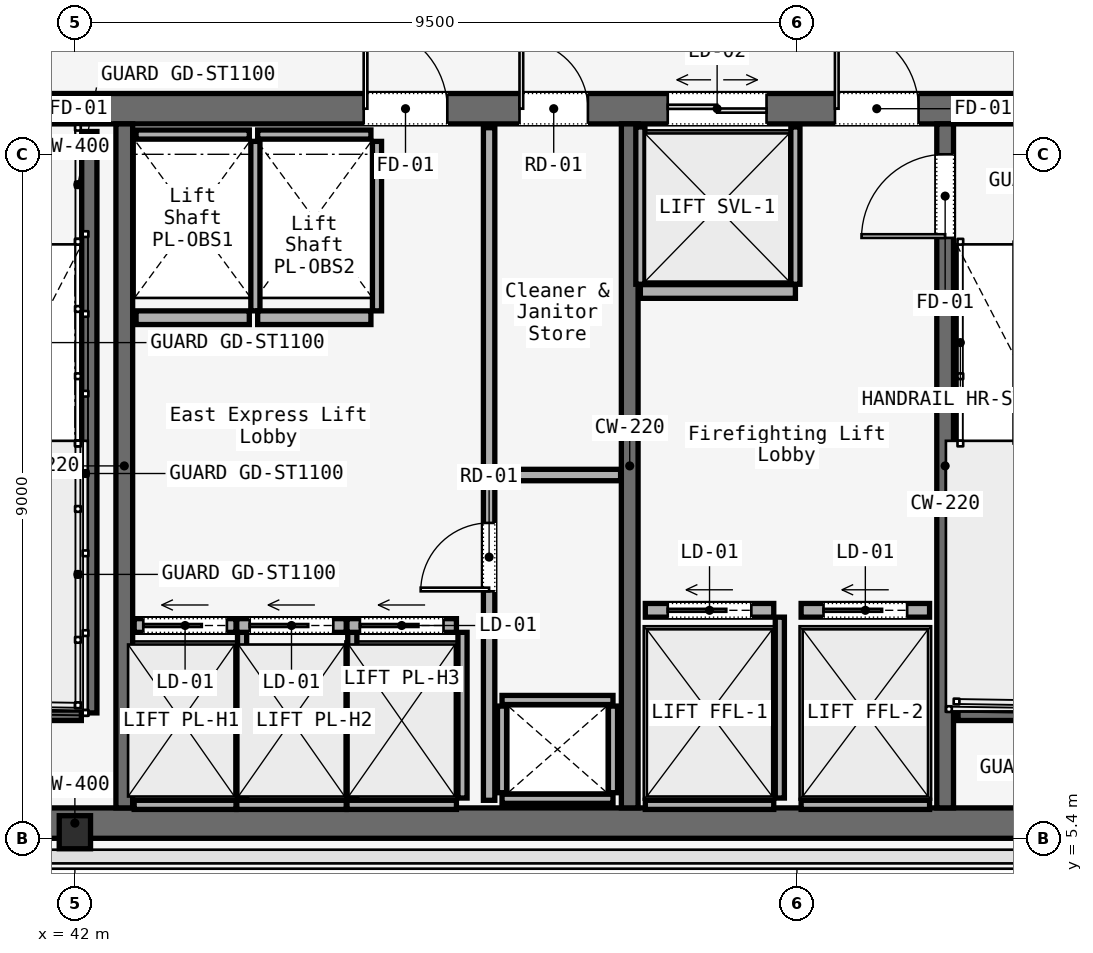
"""IFC4 building model, lengths in metres.
Left out: names, types, materials, properties, quantities, classifications, styles, units other than length and angle.
Written with IfcOpenShell. Run it as: python <this file> out.ifc"""

import sys

from ifc_helpers import new_model, si_unit, direction, frame, frame_2d, origin, origin_2d, place, context, subcontext, project, spatial, rectangle, i_section, extrude, element, fill, save


model = new_model("IFC4")
c1 = context("Model", 3, precision=1e-05, world=origin(), true_north=direction((0.0, 1.0)))
c2 = subcontext(c1, "Body", "Model", "MODEL_VIEW")
j1 = project(units=[si_unit("LENGTHUNIT", "METRE"), si_unit("PLANEANGLEUNIT", "RADIAN")], contexts=[c1])
p1 = place(None, origin())
s1 = spatial("IfcSite", under=j1, at=p1, CompositionType="ELEMENT")
p2 = place(p1, origin())
s2 = spatial("IfcBuilding", under=s1, at=p2, CompositionType="ELEMENT")
p3 = place(p2, frame((0.0, 0.0, 225.6)))
s3 = spatial("IfcBuildingStorey", under=s2, at=p3, CompositionType="ELEMENT", Elevation=225.6)
p4 = place(p3, frame((26.45, 15.0, 0.0), z_axis=(0.0, 0.0, 1.0), x_axis=(1.0, 0.0, 0.0)))
e1 = element("IfcWall", 1, at=p4, inside=s3, PredefinedType="SOLIDWALL", context=c2, shape_type="SweptSolid", body=[
    extrude(rectangle(XDim=31.1, YDim=0.4, at=frame_2d((15.55, 0.0))), origin(), (0.0, 0.0, 1.0), 3.58),
])
p5 = place(p4, frame((1.65, 0.0, 0.0)))
e2 = element("IfcOpeningElement", 2, at=p5, cuts=e1, PredefinedType="OPENING", context=c2, shape_type="SweptSolid", body=[
    extrude(rectangle(XDim=1.1, YDim=2.2, at=frame_2d((0.55, 1.1))), frame((0.0, 0.2, 0.0), z_axis=(0.0, -1.0, 0.0), x_axis=(1.0, 0.0, 0.0)), (0.0, 0.0, 1.0), 0.4),
])
p6 = place(p4, frame((13.65, 0.0, 0.0)))
e3 = element("IfcOpeningElement", 3, at=p6, cuts=e1, PredefinedType="OPENING", context=c2, shape_type="SweptSolid", body=[
    extrude(rectangle(XDim=1.1, YDim=2.2, at=frame_2d((0.55, 1.1))), frame((0.0, 0.2, 0.0), z_axis=(0.0, -1.0, 0.0), x_axis=(1.0, 0.0, 0.0)), (0.0, 0.0, 1.0), 0.4),
])
p7 = place(p4, frame((25.55, 0.0, 0.0)))
e4 = element("IfcOpeningElement", 4, at=p7, cuts=e1, PredefinedType="OPENING", context=c2, shape_type="SweptSolid", body=[
    extrude(rectangle(XDim=1.1, YDim=2.2, at=frame_2d((0.55, 1.1))), frame((0.0, 0.2, 0.0), z_axis=(0.0, -1.0, 0.0), x_axis=(1.0, 0.0, 0.0)), (0.0, 0.0, 1.0), 0.4),
])
p8 = place(p4, frame((19.35, 0.0, 0.0)))
e5 = element("IfcOpeningElement", 5, at=p8, cuts=e1, PredefinedType="OPENING", context=c2, shape_type="SweptSolid", body=[
    extrude(rectangle(XDim=1.1, YDim=2.2, at=frame_2d((0.55, 1.1))), frame((0.0, 0.2, 0.0), z_axis=(0.0, -1.0, 0.0), x_axis=(1.0, 0.0, 0.0)), (0.0, 0.0, 1.0), 0.4),
])
p9 = place(p4, frame((21.4, 0.0, 0.0)))
e6 = element("IfcOpeningElement", 6, at=p9, cuts=e1, PredefinedType="OPENING", context=c2, shape_type="SweptSolid", body=[
    extrude(rectangle(XDim=0.9, YDim=2.1, at=frame_2d((0.45, 1.05))), frame((0.0, 0.2, 0.0), z_axis=(0.0, -1.0, 0.0), x_axis=(1.0, 0.0, 0.0)), (0.0, 0.0, 1.0), 0.4),
])
p10 = place(p4, frame((6.04, 0.0, 0.0)))
e7 = element("IfcOpeningElement", 7, at=p10, cuts=e1, PredefinedType="OPENING", context=c2, shape_type="SweptSolid", body=[
    extrude(rectangle(XDim=0.95, YDim=2.2, at=frame_2d((0.475, 1.1))), frame((0.0, 0.2, 0.0), z_axis=(0.0, -1.0, 0.0), x_axis=(1.0, 0.0, 0.0)), (0.0, 0.0, 1.0), 0.4),
])
p11 = place(p4, frame((9.99, 0.0, 0.0)))
e8 = element("IfcOpeningElement", 8, at=p11, cuts=e1, PredefinedType="OPENING", context=c2, shape_type="SweptSolid", body=[
    extrude(rectangle(XDim=0.95, YDim=2.2, at=frame_2d((0.475, 1.1))), frame((0.0, 0.2, 0.0), z_axis=(0.0, -1.0, 0.0), x_axis=(1.0, 0.0, 0.0)), (0.0, 0.0, 1.0), 0.4),
])
p12 = place(p4, frame((23.35, 0.0, 0.0)))
e9 = element("IfcOpeningElement", 9, at=p12, cuts=e1, PredefinedType="OPENING", context=c2, shape_type="SweptSolid", body=[
    extrude(rectangle(XDim=1.3, YDim=2.3, at=frame_2d((0.65, 1.15))), frame((0.0, 0.2, 0.0), z_axis=(0.0, -1.0, 0.0), x_axis=(1.0, 0.0, 0.0)), (0.0, 0.0, 1.0), 0.4),
])
p13 = place(p3, frame((26.45, 5.6, 0.0), z_axis=(0.0, 0.0, 1.0), x_axis=(1.0, 0.0, 0.0)))
e10 = element("IfcWall", 10, at=p13, inside=s3, PredefinedType="SOLIDWALL", context=c2, shape_type="SweptSolid", body=[
    extrude(rectangle(XDim=31.1, YDim=0.4, at=frame_2d((15.55, 0.0))), origin(), (0.0, 0.0, 1.0), 3.58),
])
for number, where, z_axis, x_axis in (
    (11, (42.65, 5.8, 0.0), (0.0, 0.0, 1.0), (0.0, 1.0, 0.0)),
    (12, (49.3, 5.8, 0.0), (0.0, 0.0, 1.0), (0.0, 1.0, 0.0)),
):
    element("IfcWall", number, at=place(p3, frame(where, z_axis=z_axis, x_axis=x_axis)), inside=s3, PredefinedType="SOLIDWALL", context=c2, shape_type="SweptSolid", body=[
        extrude(rectangle(XDim=9.0, YDim=0.22, at=frame_2d((4.5, 0.0))), origin(), (0.0, 0.0, 1.0), 3.58),
    ])
p14 = place(p3, frame((53.45, 5.8, 0.0), z_axis=(0.0, 0.0, 1.0), x_axis=(0.0, 1.0, 0.0)))
e13 = element("IfcWall", 13, at=p14, inside=s3, PredefinedType="SOLIDWALL", context=c2, shape_type="SweptSolid", body=[
    extrude(rectangle(XDim=9.0, YDim=0.22, at=frame_2d((4.5, 0.0))), origin(), (0.0, 0.0, 1.0), 3.58),
])
p15 = place(p14, frame((7.5, 0.0, 0.0)))
e14 = element("IfcOpeningElement", 14, at=p15, cuts=e13, PredefinedType="OPENING", context=c2, shape_type="SweptSolid", body=[
    extrude(rectangle(XDim=1.1, YDim=2.2, at=frame_2d((0.55, 1.1))), frame((0.0, 0.11, 0.0), z_axis=(0.0, -1.0, 0.0), x_axis=(1.0, 0.0, 0.0)), (0.0, 0.0, 1.0), 0.22),
])
p16 = place(p3, frame((42.0, 5.48, 0.0), z_axis=(0.0, 0.0, 1.0), x_axis=(1.0, 0.0, 0.0)))
e15 = element("IfcColumn", 15, at=p16, inside=s3, PredefinedType="COLUMN", context=c2, shape_type="SweptSolid", body=[
    extrude(i_section(OverallWidth=0.412, OverallDepth=0.435, WebThickness=0.036, FlangeThickness=0.044, FilletRadius=0.015, at=origin_2d()), origin(), (0.0, 0.0, 1.0), 3.58),
])
p17 = place(p3, frame((42.19, 14.7, 0.0), z_axis=(0.0, 0.0, 1.0), x_axis=(0.0, -1.0, 0.0)))
e16 = element("IfcWall", 16, at=p17, inside=s3, PredefinedType="SOLIDWALL", context=c2, shape_type="SweptSolid", body=[
    extrude(rectangle(XDim=7.65, YDim=0.2, at=frame_2d((3.825, 0.0))), origin(), (0.0, 0.0, 1.0), 3.8),
])
for number, where, z_axis, x_axis in (
    (17, (38.97, 7.05, 0.0), (0.0, 0.0, 1.0), (1.0, 0.0, 0.0)),
    (18, (53.62, 7.05, 0.0), (0.0, 0.0, 1.0), (1.0, 0.0, 0.0)),
):
    element("IfcWall", number, at=place(p3, frame(where, z_axis=z_axis, x_axis=x_axis)), inside=s3, PredefinedType="SOLIDWALL", context=c2, shape_type="SweptSolid", body=[
        extrude(rectangle(XDim=3.115, YDim=0.2, at=frame_2d((1.558, 0.0))), origin(), (0.0, 0.0, 1.0), 3.8),
    ])
for number, where, z_axis, x_axis in (
    (19, (47.62, 5.92, 0.0), (0.0, 0.0, 1.0), (1.0, 0.0, 0.0)),
    (20, (47.62, 7.22, 0.0), (0.0, 0.0, 1.0), (1.0, 0.0, 0.0)),
):
    element("IfcWall", number, at=place(p3, frame(where, z_axis=z_axis, x_axis=x_axis)), inside=s3, PredefinedType="SOLIDWALL", context=c2, shape_type="SweptSolid", body=[
        extrude(rectangle(XDim=1.46, YDim=0.12, at=frame_2d((0.73, 0.0))), origin(), (0.0, 0.0, 1.0), 3.01),
    ])
for number, where, z_axis, x_axis in (
    (21, (47.62, 6.0, 0.0), (0.0, 0.0, 1.0), (0.0, 1.0, 0.0)),
    (22, (49.08, 6.0, 0.0), (0.0, 0.0, 1.0), (0.0, 1.0, 0.0)),
):
    element("IfcWall", number, at=place(p3, frame(where, z_axis=z_axis, x_axis=x_axis)), inside=s3, PredefinedType="SOLIDWALL", context=c2, shape_type="SweptSolid", body=[
        extrude(rectangle(XDim=1.14, YDim=0.12, at=frame_2d((0.57, 0.0))), origin(), (0.0, 0.0, 1.0), 3.01),
    ])
p18 = place(p3, frame((47.45, 5.9, 0.0), z_axis=(0.0, 0.0, 1.0), x_axis=(0.0, 1.0, 0.0)))
e23 = element("IfcWall", 23, at=p18, inside=s3, PredefinedType="PARTITIONING", context=c2, shape_type="SweptSolid", body=[
    extrude(rectangle(XDim=8.85, YDim=0.15, at=frame_2d((4.425, 0.0))), origin(), (0.0, 0.0, 1.0), 3.01),
])
p19 = place(p18, frame((2.75, 0.0, 0.0)))
e24 = element("IfcOpeningElement", 24, at=p19, cuts=e23, PredefinedType="OPENING", context=c2, shape_type="SweptSolid", body=[
    extrude(rectangle(XDim=0.9, YDim=2.1, at=frame_2d((0.45, 1.05))), frame((0.0, 0.075, 0.0), z_axis=(0.0, -1.0, 0.0), x_axis=(1.0, 0.0, 0.0)), (0.0, 0.0, 1.0), 0.15),
])
p20 = place(p3, frame((47.45, 10.18, 0.0), z_axis=(0.0, 0.0, 1.0), x_axis=(1.0, 0.0, 0.0)))
e25 = element("IfcWall", 25, at=p20, inside=s3, PredefinedType="PARTITIONING", context=c2, shape_type="SweptSolid", body=[
    extrude(rectangle(XDim=1.73, YDim=0.15, at=frame_2d((0.865, 0.0))), origin(), (0.0, 0.0, 1.0), 3.01),
])
p21 = place(p3, frame((42.78, 8.2, 0.0), z_axis=(0.0, 0.0, 1.0), x_axis=(1.0, 0.0, 0.0)))
e26 = element("IfcWall", 26, at=p21, inside=s3, PredefinedType="SOLIDWALL", context=c2, shape_type="SweptSolid", body=[
    extrude(rectangle(XDim=1.34, YDim=0.18, at=frame_2d((0.67, 0.0))), origin(), (0.0, 0.0, 1.0), 3.01),
])
p22 = place(p21, frame((0.12, 0.0, 0.0)))
e27 = element("IfcOpeningElement", 27, at=p22, cuts=e26, PredefinedType="OPENING", context=c2, shape_type="SweptSolid", body=[
    extrude(rectangle(XDim=1.1, YDim=2.2, at=frame_2d((0.55, 1.1))), frame((0.0, 0.09, 0.0), z_axis=(0.0, -1.0, 0.0), x_axis=(1.0, 0.0, 0.0)), (0.0, 0.0, 1.0), 0.18),
])
p23 = place(p3, frame((42.78, 5.84, 0.0), z_axis=(0.0, 0.0, 1.0), x_axis=(1.0, 0.0, 0.0)))
e28 = element("IfcWall", 28, at=p23, inside=s3, PredefinedType="SOLIDWALL", context=c2, shape_type="SweptSolid", body=[
    extrude(rectangle(XDim=1.34, YDim=0.12, at=frame_2d((0.67, 0.0))), origin(), (0.0, 0.0, 1.0), 3.01),
])
p24 = place(p3, frame((44.2, 5.93, 0.0), z_axis=(0.0, 0.0, 1.0), x_axis=(0.0, 1.0, 0.0)))
e29 = element("IfcWall", 29, at=p24, inside=s3, PredefinedType="SOLIDWALL", context=c2, shape_type="SweptSolid", body=[
    extrude(rectangle(XDim=2.18, YDim=0.12, at=frame_2d((1.09, 0.0))), origin(), (0.0, 0.0, 1.0), 3.01),
])
p25 = place(p3, frame((44.13, 8.2, 0.0), z_axis=(0.0, 0.0, 1.0), x_axis=(1.0, 0.0, 0.0)))
e30 = element("IfcWall", 30, at=p25, inside=s3, PredefinedType="SOLIDWALL", context=c2, shape_type="SweptSolid", body=[
    extrude(rectangle(XDim=1.44, YDim=0.18, at=frame_2d((0.72, 0.0))), origin(), (0.0, 0.0, 1.0), 3.01),
])
p26 = place(p25, frame((0.17, 0.0, 0.0)))
e31 = element("IfcOpeningElement", 31, at=p26, cuts=e30, PredefinedType="OPENING", context=c2, shape_type="SweptSolid", body=[
    extrude(rectangle(XDim=1.1, YDim=2.2, at=frame_2d((0.55, 1.1))), frame((0.0, 0.09, 0.0), z_axis=(0.0, -1.0, 0.0), x_axis=(1.0, 0.0, 0.0)), (0.0, 0.0, 1.0), 0.18),
])
p27 = place(p3, frame((44.13, 5.84, 0.0), z_axis=(0.0, 0.0, 1.0), x_axis=(1.0, 0.0, 0.0)))
e32 = element("IfcWall", 32, at=p27, inside=s3, PredefinedType="SOLIDWALL", context=c2, shape_type="SweptSolid", body=[
    extrude(rectangle(XDim=1.44, YDim=0.12, at=frame_2d((0.72, 0.0))), origin(), (0.0, 0.0, 1.0), 3.01),
])
p28 = place(p3, frame((45.65, 5.93, 0.0), z_axis=(0.0, 0.0, 1.0), x_axis=(0.0, 1.0, 0.0)))
e33 = element("IfcWall", 33, at=p28, inside=s3, PredefinedType="SOLIDWALL", context=c2, shape_type="SweptSolid", body=[
    extrude(rectangle(XDim=2.18, YDim=0.12, at=frame_2d((1.09, 0.0))), origin(), (0.0, 0.0, 1.0), 3.01),
])
p29 = place(p3, frame((45.58, 8.2, 0.0), z_axis=(0.0, 0.0, 1.0), x_axis=(1.0, 0.0, 0.0)))
e34 = element("IfcWall", 34, at=p29, inside=s3, PredefinedType="SOLIDWALL", context=c2, shape_type="SweptSolid", body=[
    extrude(rectangle(XDim=1.44, YDim=0.18, at=frame_2d((0.72, 0.0))), origin(), (0.0, 0.0, 1.0), 3.01),
])
p30 = place(p29, frame((0.17, 0.0, 0.0)))
e35 = element("IfcOpeningElement", 35, at=p30, cuts=e34, PredefinedType="OPENING", context=c2, shape_type="SweptSolid", body=[
    extrude(rectangle(XDim=1.1, YDim=2.2, at=frame_2d((0.55, 1.1))), frame((0.0, 0.09, 0.0), z_axis=(0.0, -1.0, 0.0), x_axis=(1.0, 0.0, 0.0)), (0.0, 0.0, 1.0), 0.18),
])
p31 = place(p3, frame((45.58, 5.84, 0.0), z_axis=(0.0, 0.0, 1.0), x_axis=(1.0, 0.0, 0.0)))
e36 = element("IfcWall", 36, at=p31, inside=s3, PredefinedType="SOLIDWALL", context=c2, shape_type="SweptSolid", body=[
    extrude(rectangle(XDim=1.44, YDim=0.12, at=frame_2d((0.72, 0.0))), origin(), (0.0, 0.0, 1.0), 3.01),
])
p32 = place(p3, frame((47.1, 5.93, 0.0), z_axis=(0.0, 0.0, 1.0), x_axis=(0.0, 1.0, 0.0)))
e37 = element("IfcWall", 37, at=p32, inside=s3, PredefinedType="SOLIDWALL", context=c2, shape_type="SweptSolid", body=[
    extrude(rectangle(XDim=2.18, YDim=0.12, at=frame_2d((1.09, 0.0))), origin(), (0.0, 0.0, 1.0), 3.01),
])
p33 = place(p3, frame((42.805, 12.25, 0.0), z_axis=(0.0, 0.0, 1.0), x_axis=(1.0, 0.0, 0.0)))
e38 = element("IfcWall", 38, at=p33, inside=s3, PredefinedType="SOLIDWALL", context=c2, shape_type="SweptSolid", body=[
    extrude(rectangle(XDim=1.49, YDim=0.18, at=frame_2d((0.745, 0.0))), origin(), (0.0, 0.0, 1.0), 3.01),
])
p34 = place(p3, frame((42.805, 14.66, 0.0), z_axis=(0.0, 0.0, 1.0), x_axis=(1.0, 0.0, 0.0)))
e39 = element("IfcWall", 39, at=p34, inside=s3, PredefinedType="SOLIDWALL", context=c2, shape_type="SweptSolid", body=[
    extrude(rectangle(XDim=1.49, YDim=0.12, at=frame_2d((0.745, 0.0))), origin(), (0.0, 0.0, 1.0), 3.01),
])
p35 = place(p3, frame((44.375, 12.34, 0.0), z_axis=(0.0, 0.0, 1.0), x_axis=(0.0, 1.0, 0.0)))
e40 = element("IfcWall", 40, at=p35, inside=s3, PredefinedType="SOLIDWALL", context=c2, shape_type="SweptSolid", body=[
    extrude(rectangle(XDim=2.23, YDim=0.12, at=frame_2d((1.115, 0.0))), origin(), (0.0, 0.0, 1.0), 3.01),
])
p36 = place(p3, frame((44.405, 12.25, 0.0), z_axis=(0.0, 0.0, 1.0), x_axis=(1.0, 0.0, 0.0)))
e41 = element("IfcWall", 41, at=p36, inside=s3, PredefinedType="SOLIDWALL", context=c2, shape_type="SweptSolid", body=[
    extrude(rectangle(XDim=1.49, YDim=0.18, at=frame_2d((0.745, 0.0))), origin(), (0.0, 0.0, 1.0), 3.01),
])
p37 = place(p3, frame((44.405, 14.66, 0.0), z_axis=(0.0, 0.0, 1.0), x_axis=(1.0, 0.0, 0.0)))
e42 = element("IfcWall", 42, at=p37, inside=s3, PredefinedType="SOLIDWALL", context=c2, shape_type="SweptSolid", body=[
    extrude(rectangle(XDim=1.49, YDim=0.12, at=frame_2d((0.745, 0.0))), origin(), (0.0, 0.0, 1.0), 3.01),
])
p38 = place(p3, frame((45.975, 12.34, 0.0), z_axis=(0.0, 0.0, 1.0), x_axis=(0.0, 1.0, 0.0)))
e43 = element("IfcWall", 43, at=p38, inside=s3, PredefinedType="SOLIDWALL", context=c2, shape_type="SweptSolid", body=[
    extrude(rectangle(XDim=2.23, YDim=0.12, at=frame_2d((1.115, 0.0))), origin(), (0.0, 0.0, 1.0), 3.01),
])
p39 = place(p3, frame((49.505, 8.4, 0.0), z_axis=(0.0, 0.0, 1.0), x_axis=(1.0, 0.0, 0.0)))
e44 = element("IfcWall", 44, at=p39, inside=s3, PredefinedType="SOLIDWALL", context=c2, shape_type="SweptSolid", body=[
    extrude(rectangle(XDim=1.69, YDim=0.18, at=frame_2d((0.845, 0.0))), origin(), (0.0, 0.0, 1.0), 3.01),
])
p40 = place(p39, frame((0.295, 0.0, 0.0)))
e45 = element("IfcOpeningElement", 45, at=p40, cuts=e44, PredefinedType="OPENING", context=c2, shape_type="SweptSolid", body=[
    extrude(rectangle(XDim=1.1, YDim=2.2, at=frame_2d((0.55, 1.1))), frame((0.0, 0.09, 0.0), z_axis=(0.0, -1.0, 0.0), x_axis=(1.0, 0.0, 0.0)), (0.0, 0.0, 1.0), 0.18),
])
p41 = place(p3, frame((49.505, 5.84, 0.0), z_axis=(0.0, 0.0, 1.0), x_axis=(1.0, 0.0, 0.0)))
e46 = element("IfcWall", 46, at=p41, inside=s3, PredefinedType="SOLIDWALL", context=c2, shape_type="SweptSolid", body=[
    extrude(rectangle(XDim=1.69, YDim=0.12, at=frame_2d((0.845, 0.0))), origin(), (0.0, 0.0, 1.0), 3.01),
])
p42 = place(p3, frame((51.275, 5.93, 0.0), z_axis=(0.0, 0.0, 1.0), x_axis=(0.0, 1.0, 0.0)))
e47 = element("IfcWall", 47, at=p42, inside=s3, PredefinedType="SOLIDWALL", context=c2, shape_type="SweptSolid", body=[
    extrude(rectangle(XDim=2.38, YDim=0.12, at=frame_2d((1.19, 0.0))), origin(), (0.0, 0.0, 1.0), 3.01),
])
p43 = place(p3, frame((51.555, 8.4, 0.0), z_axis=(0.0, 0.0, 1.0), x_axis=(1.0, 0.0, 0.0)))
e48 = element("IfcWall", 48, at=p43, inside=s3, PredefinedType="SOLIDWALL", context=c2, shape_type="SweptSolid", body=[
    extrude(rectangle(XDim=1.69, YDim=0.18, at=frame_2d((0.845, 0.0))), origin(), (0.0, 0.0, 1.0), 3.01),
])
p44 = place(p43, frame((0.295, 0.0, 0.0)))
e49 = element("IfcOpeningElement", 49, at=p44, cuts=e48, PredefinedType="OPENING", context=c2, shape_type="SweptSolid", body=[
    extrude(rectangle(XDim=1.1, YDim=2.2, at=frame_2d((0.55, 1.1))), frame((0.0, 0.09, 0.0), z_axis=(0.0, -1.0, 0.0), x_axis=(1.0, 0.0, 0.0)), (0.0, 0.0, 1.0), 0.18),
])
p45 = place(p3, frame((51.555, 5.84, 0.0), z_axis=(0.0, 0.0, 1.0), x_axis=(1.0, 0.0, 0.0)))
e50 = element("IfcWall", 50, at=p45, inside=s3, PredefinedType="SOLIDWALL", context=c2, shape_type="SweptSolid", body=[
    extrude(rectangle(XDim=1.69, YDim=0.12, at=frame_2d((0.845, 0.0))), origin(), (0.0, 0.0, 1.0), 3.01),
])
p46 = place(p3, frame((49.44, 12.595, 0.0), z_axis=(0.0, 0.0, 1.0), x_axis=(1.0, 0.0, 0.0)))
e51 = element("IfcWall", 51, at=p46, inside=s3, PredefinedType="SOLIDWALL", context=c2, shape_type="SweptSolid", body=[
    extrude(rectangle(XDim=2.04, YDim=0.18, at=frame_2d((1.02, 0.0))), origin(), (0.0, 0.0, 1.0), 3.01),
])
for number, where, z_axis, x_axis in (
    (52, (49.44, 12.69, 0.0), (0.0, 0.0, 1.0), (0.0, 1.0, 0.0)),
    (53, (51.48, 12.69, 0.0), (0.0, 0.0, 1.0), (0.0, 1.0, 0.0)),
):
    element("IfcWall", number, at=place(p3, frame(where, z_axis=z_axis, x_axis=x_axis)), inside=s3, PredefinedType="SOLIDWALL", context=c2, shape_type="SweptSolid", body=[
        extrude(rectangle(XDim=2.07, YDim=0.12, at=frame_2d((1.035, 0.0))), origin(), (0.0, 0.0, 1.0), 3.01),
    ])
p47 = place(p7, origin())
e54 = element("IfcDoor", 54, at=p47, inside=s3, OperationType="SINGLE_SWING_RIGHT", PredefinedType="DOOR", context=c2, shape_type="SweptSolid", body=[
    extrude(rectangle(XDim=1.1, YDim=2.2, at=frame_2d((0.55, 1.1))), frame((0.0, 0.025, 0.0), z_axis=(0.0, -1.0, 0.0), x_axis=(1.0, 0.0, 0.0)), (0.0, 0.0, 1.0), 0.05),
])
fill(e4, e54)
p48 = place(p8, origin())
e55 = element("IfcDoor", 55, at=p48, inside=s3, OperationType="SINGLE_SWING_LEFT", PredefinedType="DOOR", context=c2, shape_type="SweptSolid", body=[
    extrude(rectangle(XDim=1.1, YDim=2.2, at=frame_2d((0.55, 1.1))), frame((0.0, 0.025, 0.0), z_axis=(0.0, -1.0, 0.0), x_axis=(1.0, 0.0, 0.0)), (0.0, 0.0, 1.0), 0.05),
])
fill(e5, e55)
p49 = place(p9, origin())
e56 = element("IfcDoor", 56, at=p49, inside=s3, OperationType="SINGLE_SWING_LEFT", PredefinedType="DOOR", context=c2, shape_type="SweptSolid", body=[
    extrude(rectangle(XDim=0.9, YDim=2.1, at=frame_2d((0.45, 1.05))), frame((0.0, 0.025, 0.0), z_axis=(0.0, -1.0, 0.0), x_axis=(1.0, 0.0, 0.0)), (0.0, 0.0, 1.0), 0.05),
])
fill(e6, e56)
p50 = place(p15, origin())
e57 = element("IfcDoor", 57, at=p50, inside=s3, OperationType="SINGLE_SWING_LEFT", PredefinedType="DOOR", context=c2, shape_type="SweptSolid", body=[
    extrude(rectangle(XDim=1.1, YDim=2.2, at=frame_2d((0.55, 1.1))), frame((0.0, 0.025, 0.0), z_axis=(0.0, -1.0, 0.0), x_axis=(1.0, 0.0, 0.0)), (0.0, 0.0, 1.0), 0.05),
])
fill(e14, e57)
p51 = place(p19, origin())
e58 = element("IfcDoor", 58, at=p51, inside=s3, OperationType="SINGLE_SWING_RIGHT", PredefinedType="DOOR", context=c2, shape_type="SweptSolid", body=[
    extrude(rectangle(XDim=0.9, YDim=2.1, at=frame_2d((0.45, 1.05))), frame((0.0, 0.025, 0.0), z_axis=(0.0, -1.0, 0.0), x_axis=(1.0, 0.0, 0.0)), (0.0, 0.0, 1.0), 0.05),
])
fill(e24, e58)
p52 = place(p22, origin())
e59 = element("IfcDoor", 59, at=p52, inside=s3, OperationType="SLIDING_TO_LEFT", PredefinedType="DOOR", context=c2, shape_type="SweptSolid", body=[
    extrude(rectangle(XDim=1.1, YDim=2.2, at=frame_2d((0.55, 1.1))), frame((0.0, 0.025, 0.0), z_axis=(0.0, -1.0, 0.0), x_axis=(1.0, 0.0, 0.0)), (0.0, 0.0, 1.0), 0.05),
])
fill(e27, e59)
p53 = place(p26, origin())
e60 = element("IfcDoor", 60, at=p53, inside=s3, OperationType="SLIDING_TO_LEFT", PredefinedType="DOOR", context=c2, shape_type="SweptSolid", body=[
    extrude(rectangle(XDim=1.1, YDim=2.2, at=frame_2d((0.55, 1.1))), frame((0.0, 0.025, 0.0), z_axis=(0.0, -1.0, 0.0), x_axis=(1.0, 0.0, 0.0)), (0.0, 0.0, 1.0), 0.05),
])
fill(e31, e60)
p54 = place(p30, origin())
e61 = element("IfcDoor", 61, at=p54, inside=s3, OperationType="SLIDING_TO_LEFT", PredefinedType="DOOR", context=c2, shape_type="SweptSolid", body=[
    extrude(rectangle(XDim=1.1, YDim=2.2, at=frame_2d((0.55, 1.1))), frame((0.0, 0.025, 0.0), z_axis=(0.0, -1.0, 0.0), x_axis=(1.0, 0.0, 0.0)), (0.0, 0.0, 1.0), 0.05),
])
fill(e35, e61)
p55 = place(p40, origin())
e62 = element("IfcDoor", 62, at=p55, inside=s3, OperationType="SLIDING_TO_LEFT", PredefinedType="DOOR", context=c2, shape_type="SweptSolid", body=[
    extrude(rectangle(XDim=1.1, YDim=2.2, at=frame_2d((0.55, 1.1))), frame((0.0, 0.025, 0.0), z_axis=(0.0, -1.0, 0.0), x_axis=(1.0, 0.0, 0.0)), (0.0, 0.0, 1.0), 0.05),
])
fill(e45, e62)
p56 = place(p44, origin())
e63 = element("IfcDoor", 63, at=p56, inside=s3, OperationType="SLIDING_TO_LEFT", PredefinedType="DOOR", context=c2, shape_type="SweptSolid", body=[
    extrude(rectangle(XDim=1.1, YDim=2.2, at=frame_2d((0.55, 1.1))), frame((0.0, 0.025, 0.0), z_axis=(0.0, -1.0, 0.0), x_axis=(1.0, 0.0, 0.0)), (0.0, 0.0, 1.0), 0.05),
])
fill(e49, e63)
p57 = place(p12, origin())
e64 = element("IfcDoor", 64, at=p57, inside=s3, OperationType="DOUBLE_DOOR_SLIDING", PredefinedType="DOOR", context=c2, shape_type="SweptSolid", body=[
    extrude(rectangle(XDim=1.3, YDim=2.3, at=frame_2d((0.65, 1.15))), frame((0.0, 0.025, 0.0), z_axis=(0.0, -1.0, 0.0), x_axis=(1.0, 0.0, 0.0)), (0.0, 0.0, 1.0), 0.05),
])
fill(e9, e64)
save(model, sys.argv[1])
